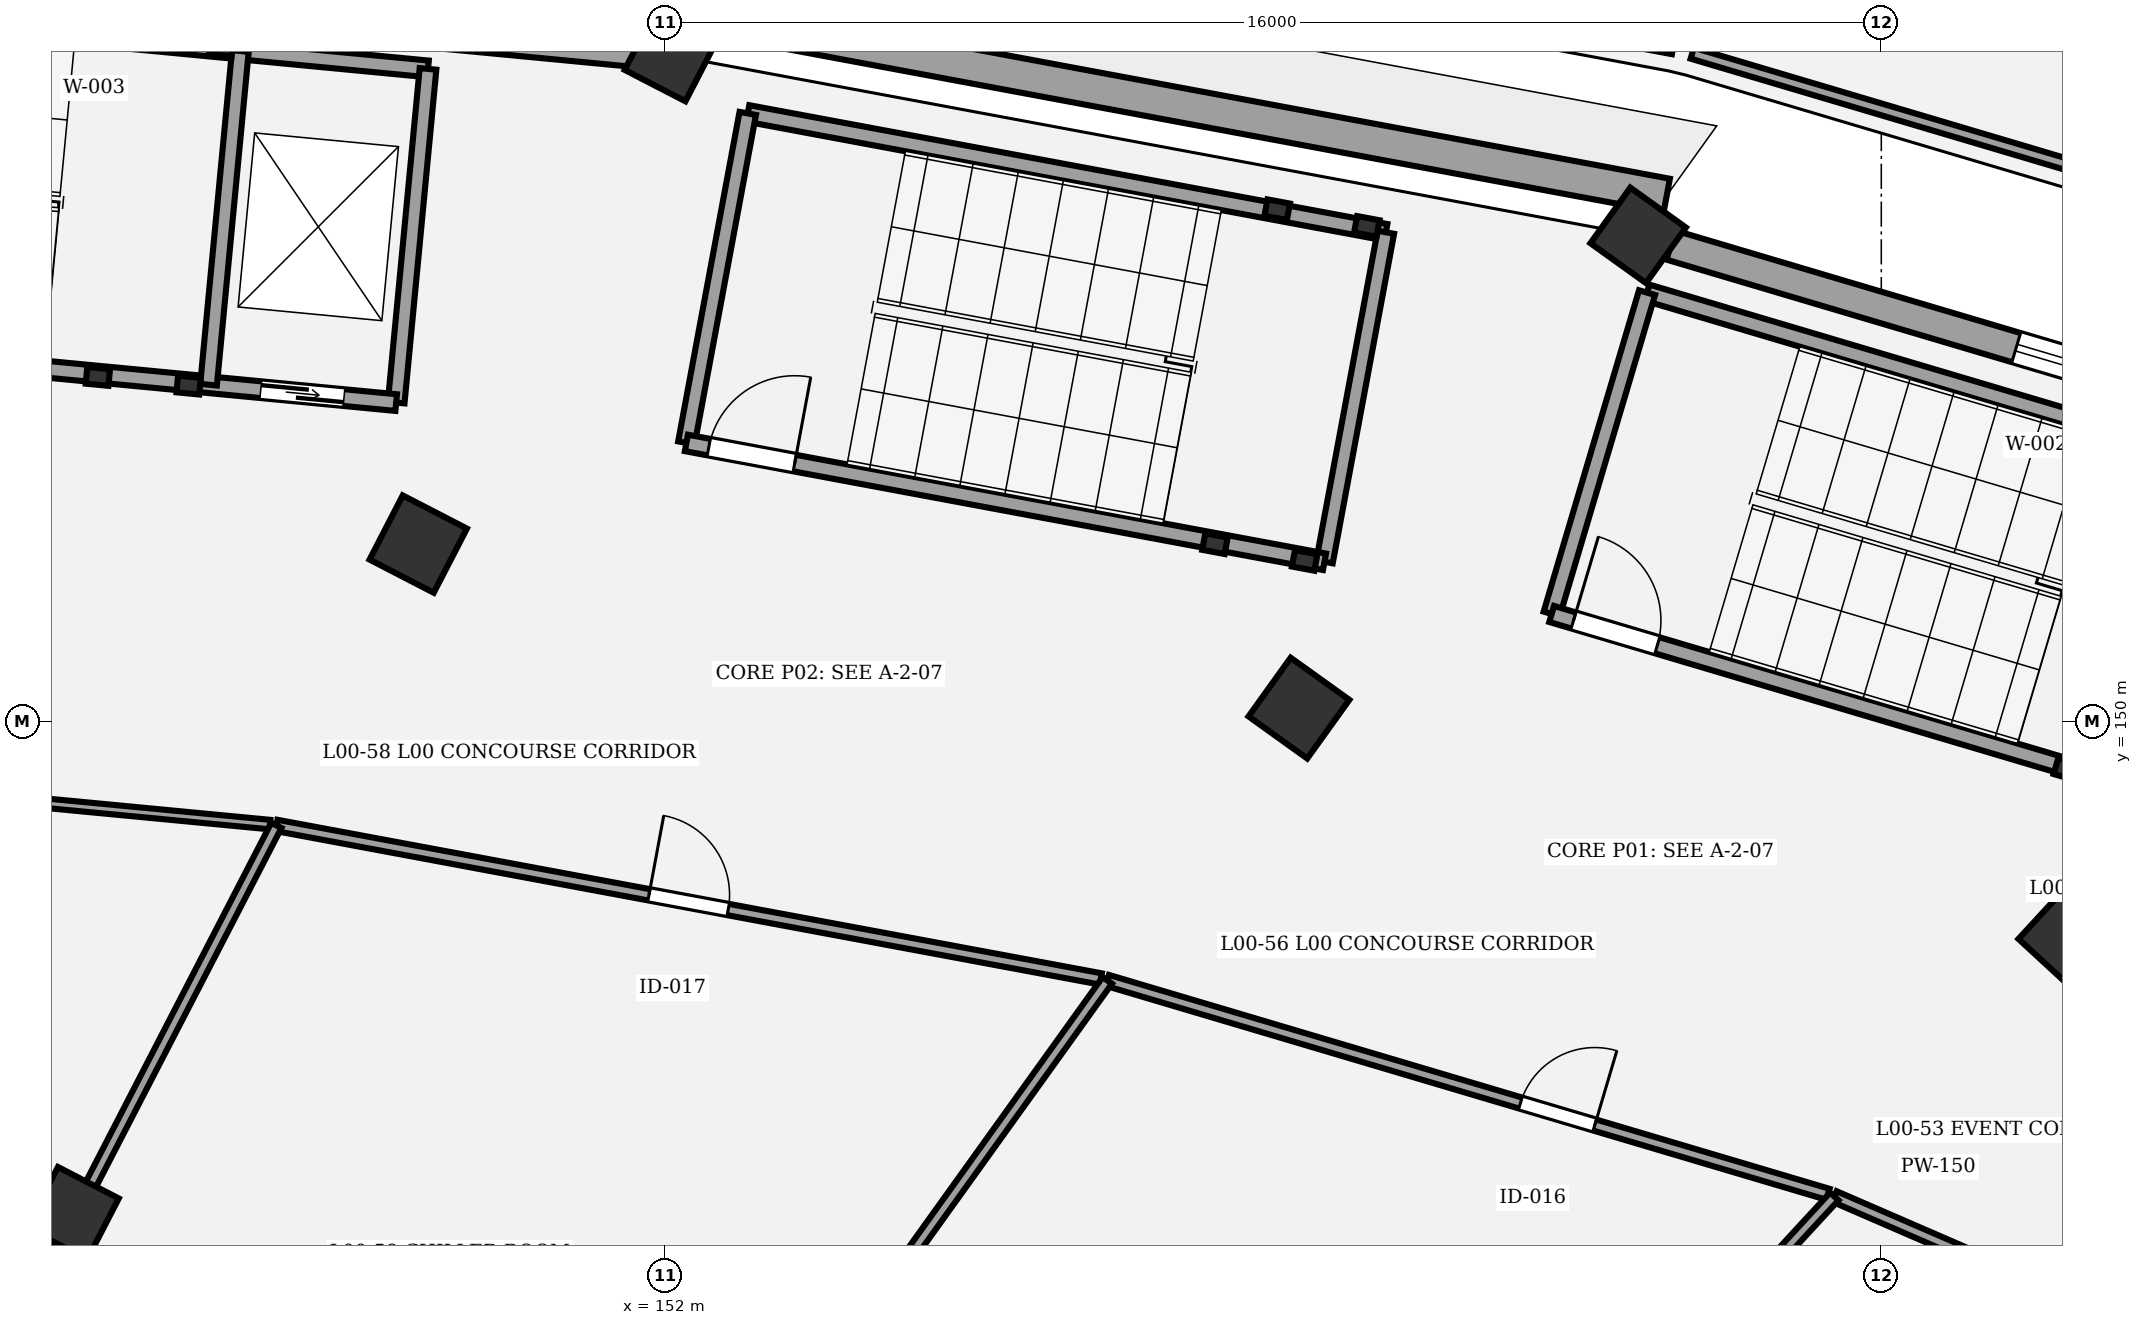
"""IFC4 building model, lengths in metres.
Left out: names, types, materials, properties, quantities, classifications, styles, units other than length and angle.
Written with IfcOpenShell. Run it as: python <this file> out.ifc"""

import sys

from ifc_helpers import new_model, si_unit, direction, frame, frame_2d, origin, origin_2d, place, context, subcontext, project, spatial, rectangle, extrude, element, fill, save


model = new_model("IFC4")
c1 = context("Model", 3, precision=1e-05, world=origin(), true_north=direction((0.0, 1.0)))
c2 = subcontext(c1, "Body", "Model", "MODEL_VIEW")
j1 = project(units=[si_unit("LENGTHUNIT", "METRE"), si_unit("PLANEANGLEUNIT", "RADIAN")], contexts=[c1])
p1 = place(None, origin())
s1 = spatial("IfcSite", under=j1, at=p1, CompositionType="ELEMENT")
p2 = place(p1, origin())
s2 = spatial("IfcBuilding", under=s1, at=p2, CompositionType="ELEMENT")
p3 = place(p2, origin())
s3 = spatial("IfcBuildingStorey", under=s2, at=p3, CompositionType="ELEMENT", Elevation=0.0)
for number, where, z_axis, x_axis in (
    (1, (170.476, 147.168, 0.0), (0.0, 0.0, 1.0), (0.678, 0.735, 0.0)),
    (2, (160.338, 150.177, 0.0), (0.0, 0.0, 1.0), (0.583, 0.812, 0.0)),
):
    element("IfcColumn", number, at=place(p3, frame(where, z_axis=z_axis, x_axis=x_axis)), inside=s3, PredefinedType="COLUMN", context=c2, shape_type="SweptSolid", body=[
        extrude(rectangle(XDim=0.95, YDim=0.95, at=origin_2d()), origin(), (0.0, 0.0, 1.0), 5.4),
    ])
for number, where, z_axis, x_axis in (
    (3, (164.801, 156.397, 0.0), (0.0, 0.0, 1.0), (0.583, 0.812, 0.0)),
    (4, (144.204, 143.534, 0.0), (0.0, 0.0, 1.0), (0.459, 0.888, 0.0)),
):
    element("IfcColumn", number, at=place(p3, frame(where, z_axis=z_axis, x_axis=x_axis)), inside=s3, PredefinedType="COLUMN", context=c2, shape_type="SweptSolid", body=[
        extrude(rectangle(XDim=0.9, YDim=0.9, at=origin_2d()), origin(), (0.0, 0.0, 1.0), 5.4),
    ])
p4 = place(p3, frame((148.75, 152.335, 0.0), z_axis=(0.0, 0.0, 1.0), x_axis=(0.458959712465, 0.888457079624, 0.0)))
e5 = element("IfcColumn", 5, at=p4, inside=s3, PredefinedType="COLUMN", context=c2, shape_type="SweptSolid", body=[
    extrude(rectangle(XDim=0.95, YDim=0.95, at=origin_2d()), origin(), (0.0, 0.0, 1.0), 5.4),
])
p5 = place(p3, frame((152.073, 158.767, 0.0), z_axis=(0.0, 0.0, 1.0), x_axis=(0.458959712465, 0.888457079624, 0.0)))
e6 = element("IfcColumn", 6, at=p5, inside=s3, PredefinedType="COLUMN", context=c2, shape_type="SweptSolid", body=[
    extrude(rectangle(XDim=0.9, YDim=0.9, at=origin_2d()), origin(), (0.0, 0.0, 1.0), 5.4),
])
p6 = place(p3, frame((165.177, 156.921, 0.0), z_axis=(0.0, 0.0, 1.0), x_axis=(-0.983095830164, 0.183091749443, 0.0)))
e7 = element("IfcWall", 7, at=p6, inside=s3, PredefinedType="USERDEFINED", context=c2, shape_type="SweptSolid", body=[
    extrude(rectangle(XDim=13.045, YDim=0.45, at=frame_2d((6.522, 0.0))), origin(), (0.0, 0.0, 1.0), 4.25),
])
p7 = place(p3, frame((165.231, 156.269, 0.0), z_axis=(0.0, 0.0, 1.0), x_axis=(0.958660844814, -0.284551198593, 0.0)))
e8 = element("IfcWall", 8, at=p7, inside=s3, PredefinedType="STANDARD", context=c2, shape_type="SweptSolid", body=[
    extrude(rectangle(XDim=10.72, YDim=0.4, at=frame_2d((5.36, 0.0))), origin(), (0.0, 0.0, 1.0), 4.25),
])
p8 = place(p7, frame((4.74, 0.0, 1.1)))
e9 = element("IfcOpeningElement", 9, at=p8, cuts=e8, PredefinedType="OPENING", context=c2, shape_type="SweptSolid", body=[
    extrude(rectangle(XDim=1.24, YDim=1.55, at=frame_2d((0.62, 0.775))), frame((0.0, 0.21, 0.0), z_axis=(0.0, -1.0, 0.0), x_axis=(1.0, 0.0, 0.0)), (0.0, 0.0, 1.0), 0.42),
])
p9 = place(p3, frame((137.561, 160.151, 0.0), z_axis=(0.0, 0.0, 1.0), x_axis=(0.995482650467, -0.094943628644, 0.0)))
e10 = element("IfcWall", 10, at=p9, inside=s3, PredefinedType="STANDARD", context=c2, shape_type="SweptSolid", body=[
    extrude(rectangle(XDim=14.13, YDim=0.4, at=frame_2d((7.065, 0.0))), origin(), (0.0, 0.0, 1.0), 4.25),
])
p10 = place(p9, frame((6.375, 0.0, 1.1)))
e11 = element("IfcOpeningElement", 11, at=p10, cuts=e10, PredefinedType="OPENING", context=c2, shape_type="SweptSolid", body=[
    extrude(rectangle(XDim=1.38, YDim=1.55, at=frame_2d((0.69, 0.775))), frame((0.0, 0.21, 0.0), z_axis=(0.0, -1.0, 0.0), x_axis=(1.0, 0.0, 0.0)), (0.0, 0.0, 1.0), 0.42),
])
for number, where, z_axis, x_axis in (
    (12, (144.535, 154.541, 0.0), (0.0, 0.0, 1.0), (0.995, -0.095, 0.0)),
    (13, (145.73, 154.427, 0.0), (0.0, 0.0, 1.0), (0.995, -0.095, 0.0)),
    (14, (146.154, 158.877, 0.0), (0.0, 0.0, 1.0), (0.995, -0.095, 0.0)),
):
    element("IfcColumn", number, at=place(p3, frame(where, z_axis=z_axis, x_axis=x_axis)), inside=s3, PredefinedType="COLUMN", context=c2, shape_type="SweptSolid", body=[
        extrude(rectangle(XDim=0.3, YDim=0.22, at=origin_2d()), origin(), (0.0, 0.0, 1.0), 5.4),
    ])
p11 = place(p3, frame((137.909, 159.634, 0.0), z_axis=(0.0, 0.0, 1.0), x_axis=(0.99547962713, -0.094975322952, 0.0)))
e15 = element("IfcWall", 15, at=p11, inside=s3, PredefinedType="SHEAR", context=c2, shape_type="SweptSolid", body=[
    extrude(rectangle(XDim=11.02, YDim=0.22, at=frame_2d((5.51, 0.0))), origin(), (0.0, 0.0, 1.0), 5.15),
])
p12 = place(p3, frame((148.46, 154.197, 0.0), z_axis=(0.0, 0.0, 1.0), x_axis=(0.095002424918, 0.995477041051, 0.0)))
e16 = element("IfcWall", 16, at=p12, inside=s3, PredefinedType="SHEAR", context=c2, shape_type="SweptSolid", body=[
    extrude(rectangle(XDim=4.41, YDim=0.22, at=frame_2d((2.205, 0.0))), origin(), (0.0, 0.0, 1.0), 5.15),
])
p13 = place(p3, frame((137.49, 155.243, 0.0), z_axis=(0.0, 0.0, 1.0), x_axis=(0.995481721489, -0.094953368458, 0.0)))
e17 = element("IfcWall", 17, at=p13, inside=s3, PredefinedType="SHEAR", context=c2, shape_type="SweptSolid", body=[
    extrude(rectangle(XDim=11.02, YDim=0.22, at=frame_2d((5.51, 0.0))), origin(), (0.0, 0.0, 1.0), 5.15),
])
p14 = place(p13, frame((0.3, 0.0, 0.0)))
e18 = element("IfcOpeningElement", 18, at=p14, cuts=e17, PredefinedType="OPENING", context=c2, shape_type="SweptSolid", body=[
    extrude(rectangle(XDim=1.15, YDim=2.15, at=frame_2d((0.575, 1.075))), frame((0.0, 0.12, 0.0), z_axis=(0.0, -1.0, 0.0), x_axis=(1.0, 0.0, 0.0)), (0.0, 0.0, 1.0), 0.24),
])
p15 = place(p13, frame((9.23, 0.0, 0.0)))
e19 = element("IfcOpeningElement", 19, at=p15, cuts=e17, PredefinedType="OPENING", context=c2, shape_type="SweptSolid", body=[
    extrude(rectangle(XDim=1.1, YDim=2.15, at=frame_2d((0.55, 1.075))), frame((0.0, 0.12, 0.0), z_axis=(0.0, -1.0, 0.0), x_axis=(1.0, 0.0, 0.0)), (0.0, 0.0, 1.0), 0.24),
])
p16 = place(p3, frame((145.991, 154.432, 0.0), z_axis=(0.0, 0.0, 1.0), x_axis=(0.094997189401, 0.995477540684, 0.0)))
e20 = element("IfcWall", 20, at=p16, inside=s3, PredefinedType="SHEAR", context=c2, shape_type="SweptSolid", body=[
    extrude(rectangle(XDim=4.41, YDim=0.22, at=frame_2d((2.205, 0.0))), origin(), (0.0, 0.0, 1.0), 5.15),
])
p17 = place(p3, frame((170.442, 149.373, 0.0), z_axis=(0.0, 0.0, 1.0), x_axis=(0.958670893355, -0.284517342588, 0.0)))
e21 = element("IfcColumn", 21, at=p17, inside=s3, PredefinedType="COLUMN", context=c2, shape_type="SweptSolid", body=[
    extrude(rectangle(XDim=0.3, YDim=0.22, at=origin_2d()), origin(), (0.0, 0.0, 1.0), 5.4),
])
p18 = place(p3, frame((164.918, 155.644, 0.0), z_axis=(0.0, 0.0, 1.0), x_axis=(0.958675743706, -0.284500998997, 0.0)))
e22 = element("IfcWall", 22, at=p18, inside=s3, PredefinedType="SHEAR", context=c2, shape_type="SweptSolid", body=[
    extrude(rectangle(XDim=8.54, YDim=0.22, at=frame_2d((4.27, 0.0))), origin(), (0.0, 0.0, 1.0), 5.15),
])
p19 = place(p3, frame((163.663, 151.416, 0.0), z_axis=(0.0, 0.0, 1.0), x_axis=(0.284497328872, 0.958676832861, 0.0)))
e23 = element("IfcWall", 23, at=p19, inside=s3, PredefinedType="SHEAR", context=c2, shape_type="SweptSolid", body=[
    extrude(rectangle(XDim=4.41, YDim=0.22, at=frame_2d((2.205, 0.0))), origin(), (0.0, 0.0, 1.0), 5.15),
])
p20 = place(p3, frame((163.663, 151.416, 0.0), z_axis=(0.0, 0.0, 1.0), x_axis=(0.958665631999, -0.284535069937, 0.0)))
e24 = element("IfcWall", 24, at=p20, inside=s3, PredefinedType="SHEAR", context=c2, shape_type="SweptSolid", body=[
    extrude(rectangle(XDim=8.54, YDim=0.22, at=frame_2d((4.27, 0.0))), origin(), (0.0, 0.0, 1.0), 5.15),
])
p21 = place(p20, frame((0.3, 0.0, 0.0)))
e25 = element("IfcOpeningElement", 25, at=p21, cuts=e24, PredefinedType="OPENING", context=c2, shape_type="SweptSolid", body=[
    extrude(rectangle(XDim=1.15, YDim=2.15, at=frame_2d((0.575, 1.075))), frame((0.0, 0.12, 0.0), z_axis=(0.0, -1.0, 0.0), x_axis=(1.0, 0.0, 0.0)), (0.0, 0.0, 1.0), 0.24),
])
for number, where, z_axis, x_axis in (
    (26, (159.233, 152.34, 0.0), (0.0, 0.0, 1.0), (0.983, -0.183, 0.0)),
    (27, (160.413, 152.121, 0.0), (0.0, 0.0, 1.0), (0.983, -0.183, 0.0)),
    (28, (161.231, 156.515, 0.0), (0.0, 0.0, 1.0), (0.983, -0.183, 0.0)),
    (29, (160.052, 156.735, 0.0), (0.0, 0.0, 1.0), (0.983, -0.183, 0.0)),
):
    element("IfcColumn", number, at=place(p3, frame(where, z_axis=z_axis, x_axis=x_axis)), inside=s3, PredefinedType="COLUMN", context=c2, shape_type="SweptSolid", body=[
        extrude(rectangle(XDim=0.3, YDim=0.22, at=origin_2d()), origin(), (0.0, 0.0, 1.0), 5.4),
    ])
p22 = place(p3, frame((153.086, 158.001, 0.0), z_axis=(0.0, 0.0, 1.0), x_axis=(0.983097993869, -0.18308013123, 0.0)))
e30 = element("IfcWall", 30, at=p22, inside=s3, PredefinedType="SHEAR", context=c2, shape_type="SweptSolid", body=[
    extrude(rectangle(XDim=8.54, YDim=0.22, at=frame_2d((4.27, 0.0))), origin(), (0.0, 0.0, 1.0), 5.15),
])
for number, where, z_axis, x_axis in (
    (31, (152.279, 153.666, 0.0), (0.0, 0.0, 1.0), (0.183, 0.983, 0.0)),
    (32, (160.674, 152.103, 0.0), (0.0, 0.0, 1.0), (0.183, 0.983, 0.0)),
):
    element("IfcWall", number, at=place(p3, frame(where, z_axis=z_axis, x_axis=x_axis)), inside=s3, PredefinedType="SHEAR", context=c2, shape_type="SweptSolid", body=[
        extrude(rectangle(XDim=4.41, YDim=0.22, at=frame_2d((2.205, 0.0))), origin(), (0.0, 0.0, 1.0), 5.15),
    ])
p23 = place(p3, frame((152.279, 153.666, 0.0), z_axis=(0.0, 0.0, 1.0), x_axis=(0.983097993869, -0.18308013123, 0.0)))
e33 = element("IfcWall", 33, at=p23, inside=s3, PredefinedType="SHEAR", context=c2, shape_type="SweptSolid", body=[
    extrude(rectangle(XDim=8.54, YDim=0.22, at=frame_2d((4.27, 0.0))), origin(), (0.0, 0.0, 1.0), 5.15),
])
p24 = place(p23, frame((0.3, 0.0, 0.0)))
e34 = element("IfcOpeningElement", 34, at=p24, cuts=e33, PredefinedType="OPENING", context=c2, shape_type="SweptSolid", body=[
    extrude(rectangle(XDim=1.15, YDim=2.15, at=frame_2d((0.575, 1.075))), frame((0.0, 0.12, 0.0), z_axis=(0.0, -1.0, 0.0), x_axis=(1.0, 0.0, 0.0)), (0.0, 0.0, 1.0), 0.24),
])
p25 = place(p3, frame((167.382, 143.753, 0.0), z_axis=(0.0, 0.0, 1.0), x_axis=(0.917494590455, -0.397748257677, 0.0)))
e35 = element("IfcWall", 35, at=p25, inside=s3, PredefinedType="PARTITIONING", context=c2, shape_type="SweptSolid", body=[
    extrude(rectangle(XDim=9.049, YDim=0.15, at=frame_2d((4.525, 0.0))), origin(), (0.0, 0.0, 1.0), 4.15),
])
p26 = place(p25, frame((6.295, 0.0, 0.0)))
e36 = element("IfcOpeningElement", 36, at=p26, cuts=e35, PredefinedType="OPENING", context=c2, shape_type="SweptSolid", body=[
    extrude(rectangle(XDim=0.94, YDim=2.2, at=frame_2d((0.47, 1.1))), frame((0.0, 0.085, 0.0), z_axis=(0.0, -1.0, 0.0), x_axis=(1.0, 0.0, 0.0)), (0.0, 0.0, 1.0), 0.17),
])
p27 = place(p3, frame((157.817, 146.596, 0.0), z_axis=(0.0, 0.0, 1.0), x_axis=(0.958655809656, -0.284568161629, 0.0)))
e37 = element("IfcWall", 37, at=p27, inside=s3, PredefinedType="PARTITIONING", context=c2, shape_type="SweptSolid", body=[
    extrude(rectangle(XDim=9.891, YDim=0.15, at=frame_2d((4.946, 0.0))), origin(), (0.0, 0.0, 1.0), 4.15),
])
p28 = place(p27, frame((5.67, 0.0, 0.0)))
e38 = element("IfcOpeningElement", 38, at=p28, cuts=e37, PredefinedType="OPENING", context=c2, shape_type="SweptSolid", body=[
    extrude(rectangle(XDim=1.02, YDim=2.2, at=frame_2d((0.51, 1.1))), frame((0.0, 0.085, 0.0), z_axis=(0.0, -1.0, 0.0), x_axis=(1.0, 0.0, 0.0)), (0.0, 0.0, 1.0), 0.17),
])
p29 = place(p3, frame((146.884, 148.635, 0.0), z_axis=(0.0, 0.0, 1.0), x_axis=(0.983097372707, -0.183083466695, 0.0)))
e39 = element("IfcWall", 39, at=p29, inside=s3, PredefinedType="PARTITIONING", context=c2, shape_type="SweptSolid", body=[
    extrude(rectangle(XDim=11.035, YDim=0.15, at=frame_2d((5.517, 0.0))), origin(), (0.0, 0.0, 1.0), 4.15),
])
p30 = place(p29, frame((4.987, 0.0, 0.0)))
e40 = element("IfcOpeningElement", 40, at=p30, cuts=e39, PredefinedType="OPENING", context=c2, shape_type="SweptSolid", body=[
    extrude(rectangle(XDim=1.06, YDim=2.2, at=frame_2d((0.53, 1.1))), frame((0.0, 0.085, 0.0), z_axis=(0.0, -1.0, 0.0), x_axis=(1.0, 0.0, 0.0)), (0.0, 0.0, 1.0), 0.17),
])
p31 = place(p3, frame((134.035, 149.862, 0.0), z_axis=(0.0, 0.0, 1.0), x_axis=(0.995485111947, -0.094917816515, 0.0)))
e41 = element("IfcWall", 41, at=p31, inside=s3, PredefinedType="PARTITIONING", context=c2, shape_type="SweptSolid", body=[
    extrude(rectangle(XDim=12.822, YDim=0.125, at=frame_2d((6.411, 0.0))), origin(), (0.0, 0.0, 1.0), 4.15),
])
p32 = place(p31, frame((5.861, 0.0, 0.0)))
e42 = element("IfcOpeningElement", 42, at=p32, cuts=e41, PredefinedType="OPENING", context=c2, shape_type="SweptSolid", body=[
    extrude(rectangle(XDim=1.1, YDim=2.2, at=frame_2d((0.55, 1.1))), frame((0.0, 0.073, 0.0), z_axis=(0.0, -1.0, 0.0), x_axis=(1.0, 0.0, 0.0)), (0.0, 0.0, 1.0), 0.145),
])
p33 = place(p3, frame((157.896, 133.465, 0.0), z_axis=(0.0, 0.0, 1.0), x_axis=(0.677851738249, 0.735198626871, 0.0)))
e43 = element("IfcWall", 43, at=p33, inside=s3, PredefinedType="PARTITIONING", context=c2, shape_type="SweptSolid", body=[
    extrude(rectangle(XDim=13.994, YDim=0.15, at=frame_2d((6.997, 0.0))), origin(), (0.0, 0.0, 1.0), 4.15),
])
p34 = place(p3, frame((150.067, 135.796, 0.0), z_axis=(0.0, 0.0, 1.0), x_axis=(0.583015953896, 0.812460705205, 0.0)))
e44 = element("IfcWall", 44, at=p34, inside=s3, PredefinedType="PARTITIONING", context=c2, shape_type="SweptSolid", body=[
    extrude(rectangle(XDim=13.292, YDim=0.15, at=frame_2d((6.646, 0.0))), origin(), (0.0, 0.0, 1.0), 4.15),
])
p35 = place(p3, frame((141.116, 137.47, 0.0), z_axis=(0.0, 0.0, 1.0), x_axis=(0.45894823356, 0.88846300931, 0.0)))
e45 = element("IfcWall", 45, at=p35, inside=s3, PredefinedType="PARTITIONING", context=c2, shape_type="SweptSolid", body=[
    extrude(rectangle(XDim=12.566, YDim=0.15, at=frame_2d((6.283, 0.0))), origin(), (0.0, 0.0, 1.0), 4.15),
])
p36 = place(p3, frame((165.259, 158.854, 0.0), z_axis=(0.0, 0.0, 1.0), x_axis=(-0.983094545276, 0.183098648406, 0.0)))
e46 = element("IfcWall", 46, at=p36, inside=s3, PredefinedType="PARTITIONING", context=c2, shape_type="SweptSolid", body=[
    extrude(rectangle(XDim=12.947, YDim=0.15, at=frame_2d((6.474, 0.0))), origin(), (0.0, 0.0, 1.0), 4.15),
])
p37 = place(p3, frame((173.64, 156.381, 0.0), z_axis=(0.0, 0.0, 1.0), x_axis=(-0.95866000112, 0.284554041006, 0.0)))
e47 = element("IfcWall", 47, at=p37, inside=s3, PredefinedType="PARTITIONING", context=c2, shape_type="SweptSolid", body=[
    extrude(rectangle(XDim=8.478, YDim=0.15, at=frame_2d((4.239, 0.0))), origin(), (0.0, 0.0, 1.0), 4.15),
])
p38 = place(p8, origin())
e48 = element("IfcWindow", 48, at=p38, inside=s3, PartitioningType="SINGLE_PANEL", PredefinedType="WINDOW", context=c2, shape_type="SweptSolid", body=[
    extrude(rectangle(XDim=1.24, YDim=1.55, at=frame_2d((0.62, 0.775))), frame((0.0, 0.03, 0.0), z_axis=(0.0, -1.0, 0.0), x_axis=(1.0, 0.0, 0.0)), (0.0, 0.0, 1.0), 0.06),
])
fill(e9, e48)
p39 = place(p15, origin())
e49 = element("IfcDoor", 49, at=p39, inside=s3, OperationType="DOUBLE_DOOR_SLIDING", PredefinedType="DOOR", context=c2, shape_type="SweptSolid", body=[
    extrude(rectangle(XDim=1.1, YDim=2.15, at=frame_2d((0.55, 1.075))), frame((0.0, 0.025, 0.0), z_axis=(0.0, -1.0, 0.0), x_axis=(1.0, 0.0, 0.0)), (0.0, 0.0, 1.0), 0.05),
])
fill(e19, e49)
p40 = place(p21, origin())
e50 = element("IfcDoor", 50, at=p40, inside=s3, OperationType="SINGLE_SWING_LEFT", PredefinedType="DOOR", context=c2, shape_type="SweptSolid", body=[
    extrude(rectangle(XDim=1.15, YDim=2.15, at=frame_2d((0.575, 1.075))), frame((0.0, 0.025, 0.0), z_axis=(0.0, -1.0, 0.0), x_axis=(1.0, 0.0, 0.0)), (0.0, 0.0, 1.0), 0.05),
])
fill(e25, e50)
p41 = place(p24, origin())
e51 = element("IfcDoor", 51, at=p41, inside=s3, OperationType="SINGLE_SWING_RIGHT", PredefinedType="DOOR", context=c2, shape_type="SweptSolid", body=[
    extrude(rectangle(XDim=1.15, YDim=2.15, at=frame_2d((0.575, 1.075))), frame((0.0, 0.025, 0.0), z_axis=(0.0, -1.0, 0.0), x_axis=(1.0, 0.0, 0.0)), (0.0, 0.0, 1.0), 0.05),
])
fill(e34, e51)
p42 = place(p28, origin())
e52 = element("IfcDoor", 52, at=p42, inside=s3, OperationType="SINGLE_SWING_RIGHT", PredefinedType="DOOR", context=c2, shape_type="SweptSolid", body=[
    extrude(rectangle(XDim=1.02, YDim=2.2, at=frame_2d((0.51, 1.1))), frame((0.0, 0.025, 0.0), z_axis=(0.0, -1.0, 0.0), x_axis=(1.0, 0.0, 0.0)), (0.0, 0.0, 1.0), 0.05),
])
fill(e38, e52)
p43 = place(p30, origin())
e53 = element("IfcDoor", 53, at=p43, inside=s3, OperationType="SINGLE_SWING_LEFT", PredefinedType="DOOR", context=c2, shape_type="SweptSolid", body=[
    extrude(rectangle(XDim=1.06, YDim=2.2, at=frame_2d((0.53, 1.1))), frame((0.0, 0.025, 0.0), z_axis=(0.0, -1.0, 0.0), x_axis=(1.0, 0.0, 0.0)), (0.0, 0.0, 1.0), 0.05),
])
fill(e40, e53)
save(model, sys.argv[1])
